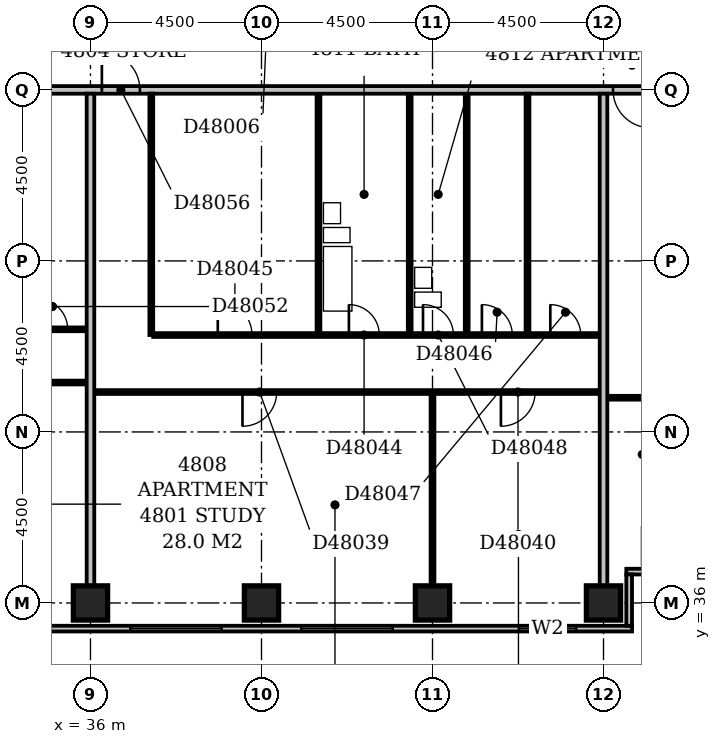
"""IFC4 building model, lengths in metres.
Left out: names, types, materials, properties, quantities, classifications, styles, units other than length and angle.
Written with IfcOpenShell. Run it as: python <this file> out.ifc"""

import sys

from ifc_helpers import new_model, si_unit, direction, frame, frame_2d, origin, origin_2d, place, context, subcontext, project, spatial, rectangle, extrude, element, fill, save


model = new_model("IFC4")
c1 = context("Model", 3, precision=1e-05, world=origin(), true_north=direction((0.0, 1.0)))
c2 = subcontext(c1, "Body", "Model", "MODEL_VIEW")
j1 = project(units=[si_unit("LENGTHUNIT", "METRE"), si_unit("PLANEANGLEUNIT", "RADIAN")], contexts=[c1])
p1 = place(None, origin())
s1 = spatial("IfcSite", under=j1, at=p1, CompositionType="ELEMENT")
p2 = place(p1, origin())
s2 = spatial("IfcBuilding", under=s1, at=p2, CompositionType="ELEMENT")
p3 = place(p2, frame((0.0, 0.0, 189.8)))
s3 = spatial("IfcBuildingStorey", under=s2, at=p3, CompositionType="ELEMENT", Elevation=189.8)
for number, where, z_axis, x_axis in (
    (1, (36.0, 36.0, -0.3), (0.0, 0.0, 1.0), (1.0, 0.0, 0.0)),
    (2, (40.5, 36.0, -0.3), (0.0, 0.0, 1.0), (1.0, 0.0, 0.0)),
    (3, (45.0, 36.0, -0.3), (0.0, 0.0, 1.0), (1.0, 0.0, 0.0)),
    (4, (49.5, 36.0, -0.3), (0.0, 0.0, 1.0), (1.0, 0.0, 0.0)),
):
    element("IfcColumn", number, at=place(p3, frame(where, z_axis=z_axis, x_axis=x_axis)), inside=s3, PredefinedType="COLUMN", context=c2, shape_type="SweptSolid", body=[
        extrude(rectangle(XDim=0.9, YDim=0.9, at=origin_2d()), origin(), (0.0, 0.0, 1.0), 3.6),
    ])
p4 = place(p3, frame((23.1, 35.325, 0.0), z_axis=(0.0, 0.0, 1.0), x_axis=(1.0, 0.0, 0.0)))
e5 = element("IfcWall", 5, at=p4, inside=s3, PredefinedType="STANDARD", context=c2, shape_type="SweptSolid", body=[
    extrude(rectangle(XDim=27.15, YDim=0.15, at=frame_2d((13.575, 0.0))), origin(), (0.0, 0.0, 1.0), 2.7),
])
p5 = place(p4, frame((0.285, 0.0, 0.6)))
e6 = element("IfcOpeningElement", 6, at=p5, cuts=e5, PredefinedType="OPENING", context=c2, shape_type="SweptSolid", body=[
    extrude(rectangle(XDim=2.1, YDim=1.8, at=frame_2d((1.05, 0.9))), frame((0.0, 0.087, 0.0), z_axis=(0.0, -1.0, 0.0), x_axis=(1.0, 0.0, 0.0)), (0.0, 0.0, 1.0), 0.174),
])
p6 = place(p4, frame((4.95, 0.0, 0.6)))
e7 = element("IfcOpeningElement", 7, at=p6, cuts=e5, PredefinedType="OPENING", context=c2, shape_type="SweptSolid", body=[
    extrude(rectangle(XDim=2.4, YDim=1.8, at=frame_2d((1.2, 0.9))), frame((0.0, 0.087, 0.0), z_axis=(0.0, -1.0, 0.0), x_axis=(1.0, 0.0, 0.0)), (0.0, 0.0, 1.0), 0.174),
])
p7 = place(p4, frame((9.45, 0.0, 0.6)))
e8 = element("IfcOpeningElement", 8, at=p7, cuts=e5, PredefinedType="OPENING", context=c2, shape_type="SweptSolid", body=[
    extrude(rectangle(XDim=2.4, YDim=1.8, at=frame_2d((1.2, 0.9))), frame((0.0, 0.087, 0.0), z_axis=(0.0, -1.0, 0.0), x_axis=(1.0, 0.0, 0.0)), (0.0, 0.0, 1.0), 0.174),
])
p8 = place(p4, frame((13.95, 0.0, 0.6)))
e9 = element("IfcOpeningElement", 9, at=p8, cuts=e5, PredefinedType="OPENING", context=c2, shape_type="SweptSolid", body=[
    extrude(rectangle(XDim=2.4, YDim=1.8, at=frame_2d((1.2, 0.9))), frame((0.0, 0.087, 0.0), z_axis=(0.0, -1.0, 0.0), x_axis=(1.0, 0.0, 0.0)), (0.0, 0.0, 1.0), 0.174),
])
p9 = place(p4, frame((18.45, 0.0, 0.6)))
e10 = element("IfcOpeningElement", 10, at=p9, cuts=e5, PredefinedType="OPENING", context=c2, shape_type="SweptSolid", body=[
    extrude(rectangle(XDim=2.4, YDim=1.8, at=frame_2d((1.2, 0.9))), frame((0.0, 0.087, 0.0), z_axis=(0.0, -1.0, 0.0), x_axis=(1.0, 0.0, 0.0)), (0.0, 0.0, 1.0), 0.174),
])
p10 = place(p4, frame((24.179, 0.0, 0.6)))
e11 = element("IfcOpeningElement", 11, at=p10, cuts=e5, PredefinedType="OPENING", context=c2, shape_type="SweptSolid", body=[
    extrude(rectangle(XDim=1.5, YDim=1.8, at=frame_2d((0.75, 0.9))), frame((0.0, 0.087, 0.0), z_axis=(0.0, -1.0, 0.0), x_axis=(1.0, 0.0, 0.0)), (0.0, 0.0, 1.0), 0.174),
])
p11 = place(p3, frame((50.175, 35.4, 0.0), z_axis=(0.0, 0.0, 1.0), x_axis=(0.0, 1.0, 0.0)))
e12 = element("IfcWall", 12, at=p11, inside=s3, PredefinedType="STANDARD", context=c2, shape_type="SweptSolid", body=[
    extrude(rectangle(XDim=1.35, YDim=0.15, at=frame_2d((0.675, 0.0))), origin(), (0.0, 0.0, 1.0), 2.7),
])
p12 = place(p3, frame((50.1, 36.825, 0.0), z_axis=(0.0, 0.0, 1.0), x_axis=(1.0, 0.0, 0.0)))
e13 = element("IfcWall", 13, at=p12, inside=s3, PredefinedType="STANDARD", context=c2, shape_type="SweptSolid", body=[
    extrude(rectangle(XDim=1.65, YDim=0.15, at=frame_2d((0.825, 0.0))), origin(), (0.0, 0.0, 1.0), 2.7),
])
p13 = place(p3, frame((36.0, 36.45, 0.0), z_axis=(0.0, 0.0, 1.0), x_axis=(0.0, 1.0, 0.0)))
e14 = element("IfcWall", 14, at=p13, inside=s3, PredefinedType="PARTITIONING", context=c2, shape_type="SweptSolid", body=[
    extrude(rectangle(XDim=12.95, YDim=0.2, at=frame_2d((6.475, 0.0))), origin(), (0.0, 0.0, 1.0), 2.4),
])
p14 = place(p3, frame((45.0, 36.45, 0.0), z_axis=(0.0, 0.0, 1.0), x_axis=(0.0, 1.0, 0.0)))
e15 = element("IfcWall", 15, at=p14, inside=s3, PredefinedType="PARTITIONING", context=c2, shape_type="SweptSolid", body=[
    extrude(rectangle(XDim=5.05, YDim=0.1, at=frame_2d((2.525, 0.0))), origin(), (0.0, 0.0, 1.0), 2.6),
])
p15 = place(p3, frame((49.5, 36.45, 0.0), z_axis=(0.0, 0.0, 1.0), x_axis=(0.0, 1.0, 0.0)))
e16 = element("IfcWall", 16, at=p15, inside=s3, PredefinedType="PARTITIONING", context=c2, shape_type="SweptSolid", body=[
    extrude(rectangle(XDim=12.95, YDim=0.2, at=frame_2d((6.475, 0.0))), origin(), (0.0, 0.0, 1.0), 3.3),
])
p16 = place(p3, frame((49.6, 41.4, 0.0), z_axis=(0.0, 0.0, 1.0), x_axis=(1.0, 0.0, 0.0)))
e17 = element("IfcWall", 17, at=p16, inside=s3, PredefinedType="PARTITIONING", context=c2, shape_type="SweptSolid", body=[
    extrude(rectangle(XDim=5.0, YDim=0.1, at=frame_2d((2.5, 0.0))), origin(), (0.0, 0.0, 1.0), 3.3),
])
p17 = place(p16, frame((1.7, 0.0, 0.0)))
e18 = element("IfcOpeningElement", 18, at=p17, cuts=e17, PredefinedType="OPENING", context=c2, shape_type="SweptSolid", body=[
    extrude(rectangle(XDim=0.9, YDim=2.1, at=frame_2d((0.45, 1.05))), frame((0.0, 0.062, 0.0), z_axis=(0.0, -1.0, 0.0), x_axis=(1.0, 0.0, 0.0)), (0.0, 0.0, 1.0), 0.124),
])
p18 = place(p3, frame((36.1, 41.55, 0.0), z_axis=(0.0, 0.0, 1.0), x_axis=(1.0, 0.0, 0.0)))
e19 = element("IfcWall", 19, at=p18, inside=s3, PredefinedType="PARTITIONING", context=c2, shape_type="SweptSolid", body=[
    extrude(rectangle(XDim=13.3, YDim=0.1, at=frame_2d((6.65, 0.0))), origin(), (0.0, 0.0, 1.0), 3.3),
])
p19 = place(p18, frame((3.9, 0.0, 0.0)))
e20 = element("IfcOpeningElement", 20, at=p19, cuts=e19, PredefinedType="OPENING", context=c2, shape_type="SweptSolid", body=[
    extrude(rectangle(XDim=0.9, YDim=2.1, at=frame_2d((0.45, 1.05))), frame((0.0, 0.062, 0.0), z_axis=(0.0, -1.0, 0.0), x_axis=(1.0, 0.0, 0.0)), (0.0, 0.0, 1.0), 0.124),
])
p20 = place(p18, frame((10.7, 0.0, 0.0)))
e21 = element("IfcOpeningElement", 21, at=p20, cuts=e19, PredefinedType="OPENING", context=c2, shape_type="SweptSolid", body=[
    extrude(rectangle(XDim=0.9, YDim=2.1, at=frame_2d((0.45, 1.05))), frame((0.0, 0.062, 0.0), z_axis=(0.0, -1.0, 0.0), x_axis=(1.0, 0.0, 0.0)), (0.0, 0.0, 1.0), 0.124),
])
p21 = place(p3, frame((22.6, 41.8, 0.0), z_axis=(0.0, 0.0, 1.0), x_axis=(1.0, 0.0, 0.0)))
e22 = element("IfcWall", 22, at=p21, inside=s3, PredefinedType="PARTITIONING", context=c2, shape_type="SweptSolid", body=[
    extrude(rectangle(XDim=13.3, YDim=0.1, at=frame_2d((6.65, 0.0))), origin(), (0.0, 0.0, 1.0), 3.3),
])
p22 = place(p21, frame((1.7, 0.0, 0.0)))
e23 = element("IfcOpeningElement", 23, at=p22, cuts=e22, PredefinedType="OPENING", context=c2, shape_type="SweptSolid", body=[
    extrude(rectangle(XDim=0.9, YDim=2.1, at=frame_2d((0.45, 1.05))), frame((0.0, 0.062, 0.0), z_axis=(0.0, -1.0, 0.0), x_axis=(1.0, 0.0, 0.0)), (0.0, 0.0, 1.0), 0.124),
])
p23 = place(p21, frame((6.2, 0.0, 0.0)))
e24 = element("IfcOpeningElement", 24, at=p23, cuts=e22, PredefinedType="OPENING", context=c2, shape_type="SweptSolid", body=[
    extrude(rectangle(XDim=0.9, YDim=2.1, at=frame_2d((0.45, 1.05))), frame((0.0, 0.062, 0.0), z_axis=(0.0, -1.0, 0.0), x_axis=(1.0, 0.0, 0.0)), (0.0, 0.0, 1.0), 0.124),
])
p24 = place(p21, frame((10.7, 0.0, 0.0)))
e25 = element("IfcOpeningElement", 25, at=p24, cuts=e22, PredefinedType="OPENING", context=c2, shape_type="SweptSolid", body=[
    extrude(rectangle(XDim=0.9, YDim=2.1, at=frame_2d((0.45, 1.05))), frame((0.0, 0.062, 0.0), z_axis=(0.0, -1.0, 0.0), x_axis=(1.0, 0.0, 0.0)), (0.0, 0.0, 1.0), 0.124),
])
p25 = place(p3, frame((37.6, 43.05, 0.0), z_axis=(0.0, 0.0, 1.0), x_axis=(0.0, 1.0, 0.0)))
e26 = element("IfcWall", 26, at=p25, inside=s3, PredefinedType="PARTITIONING", context=c2, shape_type="SweptSolid", body=[
    extrude(rectangle(XDim=6.35, YDim=0.1, at=frame_2d((3.175, 0.0))), origin(), (0.0, 0.0, 1.0), 3.3),
])
p26 = place(p3, frame((37.65, 43.05, 0.0), z_axis=(0.0, 0.0, 1.0), x_axis=(1.0, 0.0, 0.0)))
e27 = element("IfcWall", 27, at=p26, inside=s3, PredefinedType="PARTITIONING", context=c2, shape_type="SweptSolid", body=[
    extrude(rectangle(XDim=11.75, YDim=0.1, at=frame_2d((5.875, 0.0))), origin(), (0.0, 0.0, 1.0), 3.3),
])
p27 = place(p26, frame((5.15, 0.0, 0.0)))
e28 = element("IfcOpeningElement", 28, at=p27, cuts=e27, PredefinedType="OPENING", context=c2, shape_type="SweptSolid", body=[
    extrude(rectangle(XDim=0.8, YDim=2.1, at=frame_2d((0.4, 1.05))), frame((0.0, 0.062, 0.0), z_axis=(0.0, -1.0, 0.0), x_axis=(1.0, 0.0, 0.0)), (0.0, 0.0, 1.0), 0.124),
])
p28 = place(p26, frame((1.7, 0.0, 0.0)))
e29 = element("IfcOpeningElement", 29, at=p28, cuts=e27, PredefinedType="OPENING", context=c2, shape_type="SweptSolid", body=[
    extrude(rectangle(XDim=0.9, YDim=2.1, at=frame_2d((0.45, 1.05))), frame((0.0, 0.062, 0.0), z_axis=(0.0, -1.0, 0.0), x_axis=(1.0, 0.0, 0.0)), (0.0, 0.0, 1.0), 0.124),
])
p29 = place(p26, frame((8.65, 0.0, 0.0)))
e30 = element("IfcOpeningElement", 30, at=p29, cuts=e27, PredefinedType="OPENING", context=c2, shape_type="SweptSolid", body=[
    extrude(rectangle(XDim=0.8, YDim=2.1, at=frame_2d((0.4, 1.05))), frame((0.0, 0.062, 0.0), z_axis=(0.0, -1.0, 0.0), x_axis=(1.0, 0.0, 0.0)), (0.0, 0.0, 1.0), 0.124),
])
p30 = place(p26, frame((10.45, 0.0, 0.0)))
e31 = element("IfcOpeningElement", 31, at=p30, cuts=e27, PredefinedType="OPENING", context=c2, shape_type="SweptSolid", body=[
    extrude(rectangle(XDim=0.8, YDim=2.1, at=frame_2d((0.4, 1.05))), frame((0.0, 0.062, 0.0), z_axis=(0.0, -1.0, 0.0), x_axis=(1.0, 0.0, 0.0)), (0.0, 0.0, 1.0), 0.124),
])
p31 = place(p26, frame((7.1, 0.0, 0.0)))
e32 = element("IfcOpeningElement", 32, at=p31, cuts=e27, PredefinedType="OPENING", context=c2, shape_type="SweptSolid", body=[
    extrude(rectangle(XDim=0.8, YDim=2.1, at=frame_2d((0.4, 1.05))), frame((0.0, 0.062, 0.0), z_axis=(0.0, -1.0, 0.0), x_axis=(1.0, 0.0, 0.0)), (0.0, 0.0, 1.0), 0.124),
])
p32 = place(p3, frame((42.0, 43.1, 0.0), z_axis=(0.0, 0.0, 1.0), x_axis=(0.0, 1.0, 0.0)))
e33 = element("IfcWall", 33, at=p32, inside=s3, PredefinedType="PLUMBINGWALL", context=c2, shape_type="SweptSolid", body=[
    extrude(rectangle(XDim=6.3, YDim=0.1, at=frame_2d((3.15, 0.0))), origin(), (0.0, 0.0, 1.0), 3.3),
])
p33 = place(p3, frame((44.4, 43.1, 0.0), z_axis=(0.0, 0.0, 1.0), x_axis=(0.0, 1.0, 0.0)))
e34 = element("IfcWall", 34, at=p33, inside=s3, PredefinedType="PLUMBINGWALL", context=c2, shape_type="SweptSolid", body=[
    extrude(rectangle(XDim=6.3, YDim=0.1, at=frame_2d((3.15, 0.0))), origin(), (0.0, 0.0, 1.0), 2.6),
])
p34 = place(p3, frame((45.9, 43.1, 0.0), z_axis=(0.0, 0.0, 1.0), x_axis=(0.0, 1.0, 0.0)))
e35 = element("IfcWall", 35, at=p34, inside=s3, PredefinedType="PLUMBINGWALL", context=c2, shape_type="SweptSolid", body=[
    extrude(rectangle(XDim=6.3, YDim=0.1, at=frame_2d((3.15, 0.0))), origin(), (0.0, 0.0, 1.0), 3.3),
])
p35 = place(p3, frame((47.5, 43.1, 0.0), z_axis=(0.0, 0.0, 1.0), x_axis=(0.0, 1.0, 0.0)))
e36 = element("IfcWall", 36, at=p35, inside=s3, PredefinedType="PARTITIONING", context=c2, shape_type="SweptSolid", body=[
    extrude(rectangle(XDim=6.3, YDim=0.1, at=frame_2d((3.15, 0.0))), origin(), (0.0, 0.0, 1.0), 3.3),
])
p36 = place(p3, frame((30.05, 43.2, 0.0), z_axis=(0.0, 0.0, 1.0), x_axis=(1.0, 0.0, 0.0)))
e37 = element("IfcWall", 37, at=p36, inside=s3, PredefinedType="PARTITIONING", context=c2, shape_type="SweptSolid", body=[
    extrude(rectangle(XDim=5.85, YDim=0.1, at=frame_2d((2.925, 0.0))), origin(), (0.0, 0.0, 1.0), 3.3),
])
p37 = place(p36, frame((0.75, 0.0, 0.0)))
e38 = element("IfcOpeningElement", 38, at=p37, cuts=e37, PredefinedType="OPENING", context=c2, shape_type="SweptSolid", body=[
    extrude(rectangle(XDim=0.8, YDim=2.1, at=frame_2d((0.4, 1.05))), frame((0.0, 0.062, 0.0), z_axis=(0.0, -1.0, 0.0), x_axis=(1.0, 0.0, 0.0)), (0.0, 0.0, 1.0), 0.124),
])
p38 = place(p36, frame((2.75, 0.0, 0.0)))
e39 = element("IfcOpeningElement", 39, at=p38, cuts=e37, PredefinedType="OPENING", context=c2, shape_type="SweptSolid", body=[
    extrude(rectangle(XDim=0.8, YDim=2.1, at=frame_2d((0.4, 1.05))), frame((0.0, 0.062, 0.0), z_axis=(0.0, -1.0, 0.0), x_axis=(1.0, 0.0, 0.0)), (0.0, 0.0, 1.0), 0.124),
])
p39 = place(p36, frame((4.55, 0.0, 0.0)))
e40 = element("IfcOpeningElement", 40, at=p39, cuts=e37, PredefinedType="OPENING", context=c2, shape_type="SweptSolid", body=[
    extrude(rectangle(XDim=0.8, YDim=2.1, at=frame_2d((0.4, 1.05))), frame((0.0, 0.062, 0.0), z_axis=(0.0, -1.0, 0.0), x_axis=(1.0, 0.0, 0.0)), (0.0, 0.0, 1.0), 0.124),
])
p40 = place(p3, frame((22.6, 49.5, 0.0), z_axis=(0.0, 0.0, 1.0), x_axis=(1.0, 0.0, 0.0)))
e41 = element("IfcWall", 41, at=p40, inside=s3, PredefinedType="PARTITIONING", context=c2, shape_type="SweptSolid", body=[
    extrude(rectangle(XDim=30.95, YDim=0.2, at=frame_2d((15.475, 0.0))), origin(), (0.0, 0.0, 1.0), 3.3),
])
p41 = place(p40, frame((6.1, 0.0, 0.0)))
e42 = element("IfcOpeningElement", 42, at=p41, cuts=e41, PredefinedType="OPENING", context=c2, shape_type="SweptSolid", body=[
    extrude(rectangle(XDim=1.0, YDim=2.1, at=frame_2d((0.5, 1.05))), frame((0.0, 0.112, 0.0), z_axis=(0.0, -1.0, 0.0), x_axis=(1.0, 0.0, 0.0)), (0.0, 0.0, 1.0), 0.224),
])
p42 = place(p40, frame((13.7, 0.0, 0.0)))
e43 = element("IfcOpeningElement", 43, at=p42, cuts=e41, PredefinedType="OPENING", context=c2, shape_type="SweptSolid", body=[
    extrude(rectangle(XDim=1.0, YDim=2.1, at=frame_2d((0.5, 1.05))), frame((0.0, 0.112, 0.0), z_axis=(0.0, -1.0, 0.0), x_axis=(1.0, 0.0, 0.0)), (0.0, 0.0, 1.0), 0.224),
])
p43 = place(p40, frame((27.15, 0.0, 0.0)))
e44 = element("IfcOpeningElement", 44, at=p43, cuts=e41, PredefinedType="OPENING", context=c2, shape_type="SweptSolid", body=[
    extrude(rectangle(XDim=1.0, YDim=2.1, at=frame_2d((0.5, 1.05))), frame((0.0, 0.112, 0.0), z_axis=(0.0, -1.0, 0.0), x_axis=(1.0, 0.0, 0.0)), (0.0, 0.0, 1.0), 0.224),
])
p44 = place(p8, origin())
e45 = element("IfcWindow", 45, at=p44, inside=s3, PartitioningType="SINGLE_PANEL", PredefinedType="WINDOW", context=c2, shape_type="SweptSolid", body=[
    extrude(rectangle(XDim=2.4, YDim=1.8, at=frame_2d((1.2, 0.9))), frame((0.0, 0.03, 0.0), z_axis=(0.0, -1.0, 0.0), x_axis=(1.0, 0.0, 0.0)), (0.0, 0.0, 1.0), 0.06),
])
fill(e9, e45)
p45 = place(p9, origin())
e46 = element("IfcWindow", 46, at=p45, inside=s3, PartitioningType="SINGLE_PANEL", PredefinedType="WINDOW", context=c2, shape_type="SweptSolid", body=[
    extrude(rectangle(XDim=2.4, YDim=1.8, at=frame_2d((1.2, 0.9))), frame((0.0, 0.03, 0.0), z_axis=(0.0, -1.0, 0.0), x_axis=(1.0, 0.0, 0.0)), (0.0, 0.0, 1.0), 0.06),
])
fill(e10, e46)
p46 = place(p10, origin())
e47 = element("IfcWindow", 47, at=p46, inside=s3, PartitioningType="SINGLE_PANEL", PredefinedType="WINDOW", context=c2, shape_type="SweptSolid", body=[
    extrude(rectangle(XDim=1.5, YDim=1.8, at=frame_2d((0.75, 0.9))), frame((0.0, 0.03, 0.0), z_axis=(0.0, -1.0, 0.0), x_axis=(1.0, 0.0, 0.0)), (0.0, 0.0, 1.0), 0.06),
])
fill(e11, e47)
p47 = place(p19, frame((0.9, 0.0, 0.0), z_axis=(0.0, 0.0, 1.0), x_axis=(-1.0, 0.0, 0.0)))
e48 = element("IfcDoor", 48, at=p47, inside=s3, OperationType="SINGLE_SWING_RIGHT", PredefinedType="DOOR", context=c2, shape_type="SweptSolid", body=[
    extrude(rectangle(XDim=0.9, YDim=2.1, at=frame_2d((0.45, 1.05))), frame((0.0, 0.025, 0.0), z_axis=(0.0, -1.0, 0.0), x_axis=(1.0, 0.0, 0.0)), (0.0, 0.0, 1.0), 0.05),
])
fill(e20, e48)
p48 = place(p20, frame((0.9, 0.0, 0.0), z_axis=(0.0, 0.0, 1.0), x_axis=(-1.0, 0.0, 0.0)))
e49 = element("IfcDoor", 49, at=p48, inside=s3, OperationType="SINGLE_SWING_RIGHT", PredefinedType="DOOR", context=c2, shape_type="SweptSolid", body=[
    extrude(rectangle(XDim=0.9, YDim=2.1, at=frame_2d((0.45, 1.05))), frame((0.0, 0.025, 0.0), z_axis=(0.0, -1.0, 0.0), x_axis=(1.0, 0.0, 0.0)), (0.0, 0.0, 1.0), 0.05),
])
fill(e21, e49)
p49 = place(p27, origin())
e50 = element("IfcDoor", 50, at=p49, inside=s3, OperationType="SINGLE_SWING_LEFT", PredefinedType="DOOR", context=c2, shape_type="SweptSolid", body=[
    extrude(rectangle(XDim=0.8, YDim=2.1, at=frame_2d((0.4, 1.05))), frame((0.0, 0.025, 0.0), z_axis=(0.0, -1.0, 0.0), x_axis=(1.0, 0.0, 0.0)), (0.0, 0.0, 1.0), 0.05),
])
fill(e28, e50)
p50 = place(p28, origin())
e51 = element("IfcDoor", 51, at=p50, inside=s3, OperationType="SINGLE_SWING_LEFT", PredefinedType="DOOR", context=c2, shape_type="SweptSolid", body=[
    extrude(rectangle(XDim=0.9, YDim=2.1, at=frame_2d((0.45, 1.05))), frame((0.0, 0.025, 0.0), z_axis=(0.0, -1.0, 0.0), x_axis=(1.0, 0.0, 0.0)), (0.0, 0.0, 1.0), 0.05),
])
fill(e29, e51)
p51 = place(p29, origin())
e52 = element("IfcDoor", 52, at=p51, inside=s3, OperationType="SINGLE_SWING_LEFT", PredefinedType="DOOR", context=c2, shape_type="SweptSolid", body=[
    extrude(rectangle(XDim=0.8, YDim=2.1, at=frame_2d((0.4, 1.05))), frame((0.0, 0.025, 0.0), z_axis=(0.0, -1.0, 0.0), x_axis=(1.0, 0.0, 0.0)), (0.0, 0.0, 1.0), 0.05),
])
fill(e30, e52)
p52 = place(p30, origin())
e53 = element("IfcDoor", 53, at=p52, inside=s3, OperationType="SINGLE_SWING_LEFT", PredefinedType="DOOR", context=c2, shape_type="SweptSolid", body=[
    extrude(rectangle(XDim=0.8, YDim=2.1, at=frame_2d((0.4, 1.05))), frame((0.0, 0.025, 0.0), z_axis=(0.0, -1.0, 0.0), x_axis=(1.0, 0.0, 0.0)), (0.0, 0.0, 1.0), 0.05),
])
fill(e31, e53)
p53 = place(p31, origin())
e54 = element("IfcDoor", 54, at=p53, inside=s3, OperationType="SINGLE_SWING_LEFT", PredefinedType="DOOR", context=c2, shape_type="SweptSolid", body=[
    extrude(rectangle(XDim=0.8, YDim=2.1, at=frame_2d((0.4, 1.05))), frame((0.0, 0.025, 0.0), z_axis=(0.0, -1.0, 0.0), x_axis=(1.0, 0.0, 0.0)), (0.0, 0.0, 1.0), 0.05),
])
fill(e32, e54)
p54 = place(p39, origin())
e55 = element("IfcDoor", 55, at=p54, inside=s3, OperationType="SINGLE_SWING_LEFT", PredefinedType="DOOR", context=c2, shape_type="SweptSolid", body=[
    extrude(rectangle(XDim=0.8, YDim=2.1, at=frame_2d((0.4, 1.05))), frame((0.0, 0.025, 0.0), z_axis=(0.0, -1.0, 0.0), x_axis=(1.0, 0.0, 0.0)), (0.0, 0.0, 1.0), 0.05),
])
fill(e40, e55)
p55 = place(p42, origin())
e56 = element("IfcDoor", 56, at=p55, inside=s3, OperationType="SINGLE_SWING_LEFT", PredefinedType="DOOR", context=c2, shape_type="SweptSolid", body=[
    extrude(rectangle(XDim=1.0, YDim=2.1, at=frame_2d((0.5, 1.05))), frame((0.0, 0.025, 0.0), z_axis=(0.0, -1.0, 0.0), x_axis=(1.0, 0.0, 0.0)), (0.0, 0.0, 1.0), 0.05),
])
fill(e43, e56)
p56 = place(p43, origin())
e57 = element("IfcDoor", 57, at=p56, inside=s3, OperationType="SINGLE_SWING_RIGHT", PredefinedType="DOOR", context=c2, shape_type="SweptSolid", body=[
    extrude(rectangle(XDim=1.0, YDim=2.1, at=frame_2d((0.5, 1.05))), frame((0.0, 0.025, 0.0), z_axis=(0.0, -1.0, 0.0), x_axis=(1.0, 0.0, 0.0)), (0.0, 0.0, 1.0), 0.05),
])
fill(e44, e57)
save(model, sys.argv[1])
